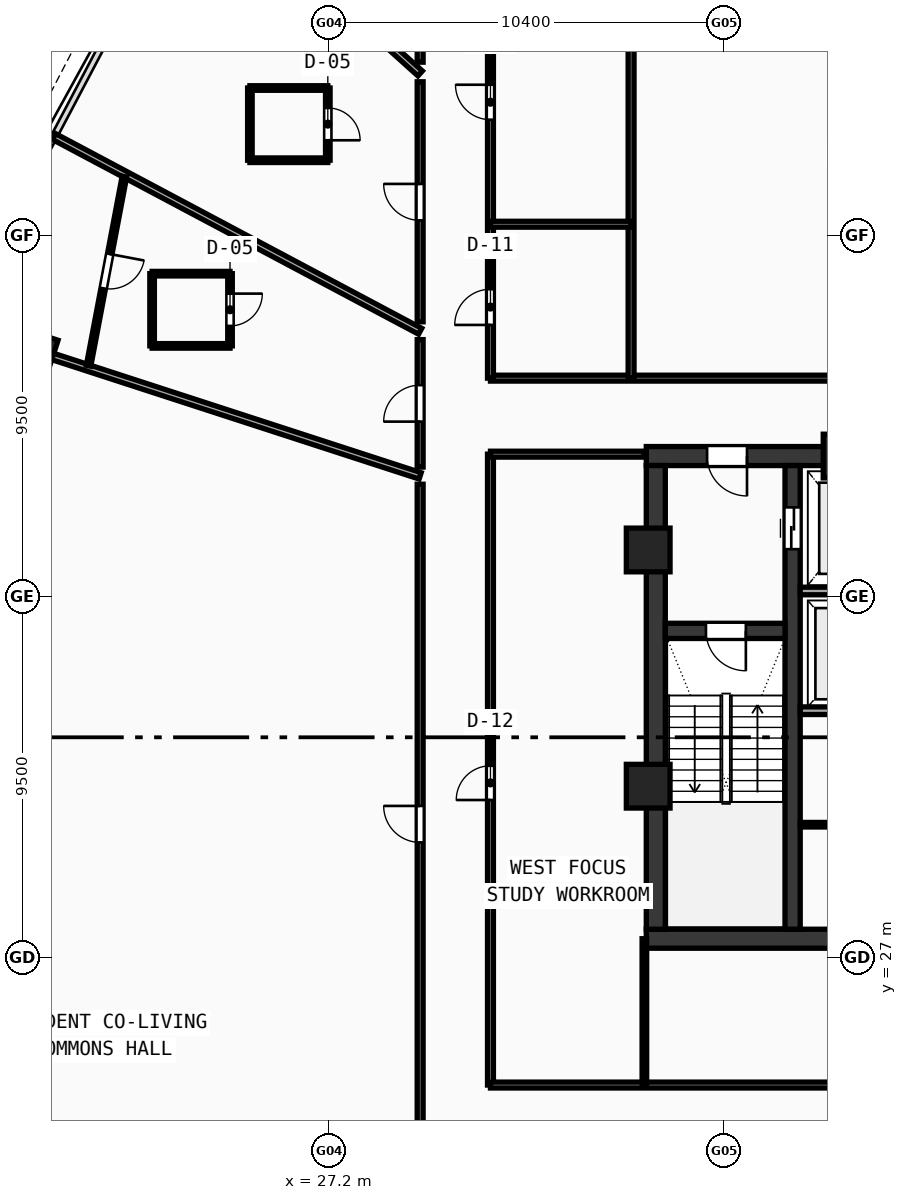
"""IFC4 building model, lengths in metres.
Left out: names, types, materials, properties, quantities, classifications, styles, units other than length and angle.
Written with IfcOpenShell. Run it as: python <this file> out.ifc"""

import sys

from ifc_helpers import new_model, si_unit, direction, frame, frame_2d, origin, origin_with_axes, origin_2d, place, context, subcontext, project, spatial, rectangle, hollow_rectangle, extrude, source, transform, mapped, element, fill, save


model = new_model("IFC4")
c1 = context("Model", 3, precision=1e-05, world=origin(), true_north=direction((0.0, 1.0)))
c2 = subcontext(c1, "Body", "Model", "MODEL_VIEW")
j1 = project(units=[si_unit("LENGTHUNIT", "METRE"), si_unit("PLANEANGLEUNIT", "RADIAN")], contexts=[c1])
p1 = place(None, origin())
s1 = spatial("IfcSite", under=j1, at=p1, CompositionType="ELEMENT")
p2 = place(p1, origin())
s2 = spatial("IfcBuilding", under=s1, at=p2, CompositionType="ELEMENT")
p3 = place(p2, frame((0.0, 0.0, 180.96)))
s3 = spatial("IfcBuildingStorey", under=s2, at=p3, CompositionType="ELEMENT", Elevation=180.96)
p4 = place(p3, frame((35.55, 27.5, 0.0), z_axis=(0.0, 0.0, 1.0), x_axis=(1.0, 0.0, 0.0)))
e1 = element("IfcWall", 1, at=p4, inside=s3, PredefinedType="SHEAR", context=c2, shape_type="SweptSolid", body=[
    extrude(rectangle(XDim=24.9, YDim=0.5, at=frame_2d((12.45, 0.0))), origin(), (0.0, 0.0, 1.0), 3.54),
])
p5 = place(p3, frame((35.55, 40.2, 0.0), z_axis=(0.0, 0.0, 1.0), x_axis=(1.0, 0.0, 0.0)))
e2 = element("IfcWall", 2, at=p5, inside=s3, PredefinedType="SHEAR", context=c2, shape_type="SweptSolid", body=[
    extrude(rectangle(XDim=11.25, YDim=0.5, at=frame_2d((5.625, 0.0))), origin(), (0.0, 0.0, 1.0), 3.54),
])
p6 = place(p5, frame((1.6, 0.0, 0.0)))
e3 = element("IfcOpeningElement", 3, at=p6, cuts=e2, PredefinedType="OPENING", context=c2, shape_type="SweptSolid", body=[
    extrude(rectangle(XDim=1.05, YDim=2.1, at=frame_2d((0.525, 1.05))), frame((0.0, 0.26, 0.0), z_axis=(0.0, -1.0, 0.0), x_axis=(1.0, 0.0, 0.0)), (0.0, 0.0, 1.0), 0.52),
])
p7 = place(p3, frame((35.8, 27.75, 0.0), z_axis=(0.0, 0.0, 1.0), x_axis=(0.0, 1.0, 0.0)))
e4 = element("IfcWall", 4, at=p7, inside=s3, PredefinedType="SHEAR", context=c2, shape_type="SweptSolid", body=[
    extrude(rectangle(XDim=12.2, YDim=0.5, at=frame_2d((6.1, 0.0))), origin(), (0.0, 0.0, 1.0), 3.54),
])
p8 = place(p3, frame((39.4, 27.75, 0.0), z_axis=(0.0, 0.0, 1.0), x_axis=(0.0, 1.0, 0.0)))
e5 = element("IfcWall", 5, at=p8, inside=s3, PredefinedType="SHEAR", context=c2, shape_type="SweptSolid", body=[
    extrude(rectangle(XDim=12.2, YDim=0.4, at=frame_2d((6.1, 0.0))), origin(), (0.0, 0.0, 1.0), 3.54),
])
p9 = place(p8, frame((10.0, 0.0, 0.0)))
e6 = element("IfcOpeningElement", 6, at=p9, cuts=e5, PredefinedType="OPENING", context=c2, shape_type="SweptSolid", body=[
    extrude(rectangle(XDim=1.1, YDim=2.1, at=frame_2d((0.55, 1.05))), frame((0.0, 0.21, 0.0), z_axis=(0.0, -1.0, 0.0), x_axis=(1.0, 0.0, 0.0)), (0.0, 0.0, 1.0), 0.42),
])
p10 = place(p3, frame((36.05, 35.6, 0.0), z_axis=(0.0, 0.0, 1.0), x_axis=(1.0, 0.0, 0.0)))
e7 = element("IfcWall", 7, at=p10, inside=s3, PredefinedType="SHEAR", context=c2, shape_type="SweptSolid", body=[
    extrude(rectangle(XDim=3.15, YDim=0.4, at=frame_2d((1.575, 0.0))), origin(), (0.0, 0.0, 1.0), 3.54),
])
p11 = place(p10, frame((1.07, 0.0, 0.0)))
e8 = element("IfcOpeningElement", 8, at=p11, cuts=e7, PredefinedType="OPENING", context=c2, shape_type="SweptSolid", body=[
    extrude(rectangle(XDim=1.05, YDim=2.1, at=frame_2d((0.525, 1.05))), frame((0.0, 0.21, 0.0), z_axis=(0.0, -1.0, 0.0), x_axis=(1.0, 0.0, 0.0)), (0.0, 0.0, 1.0), 0.42),
])
m1 = source(origin(), c2, "Body", "SweptSolid", [
    extrude(hollow_rectangle(XDim=1.15, YDim=1.15, WallThickness=0.048, at=origin_2d()), origin(), (0.0, 0.0, 1.0), 3.8),
])
for number, where, z_axis, x_axis in (
    (9, (40.781, 40.2, -0.26), (0.0, 0.0, 1.0), (1.0, 0.0, 0.0)),
    (10, (35.6, 37.729, -0.26), (0.0, 0.0, 1.0), (1.0, 0.0, 0.0)),
    (11, (35.6, 31.513, -0.26), (0.0, 0.0, 1.0), (1.0, 0.0, 0.0)),
):
    element("IfcColumn", number, at=place(p3, frame(where, z_axis=z_axis, x_axis=x_axis)), inside=s3, PredefinedType="COLUMN", context=c2, shape_type="MappedRepresentation", body=[
        mapped(m1, transform((0.0, 0.0, 0.0), scale=1.0)),
    ])
m2 = source(origin(), c2, "Body", "SweptSolid", [
    extrude(hollow_rectangle(XDim=0.9, YDim=0.9, WallThickness=0.036, at=origin_2d()), origin(), (0.0, 0.0, 1.0), 3.8),
])
p12 = place(p3, frame((19.505, 42.958, -0.26), z_axis=(0.0, 0.0, 1.0), x_axis=(-0.309016994375, -0.951056516295, 0.0)))
e12 = element("IfcColumn", 12, at=p12, inside=s3, PredefinedType="COLUMN", context=c2, shape_type="MappedRepresentation", body=[
    mapped(m2, transform((0.0, 0.0, 0.0), scale=1.0)),
])
for number, where, z_axis, x_axis in (
    (13, (39.6, 36.65, 0.0), (0.0, 0.0, 1.0), (1.0, 0.0, 0.0)),
    (14, (39.6, 33.5, 0.0), (0.0, 0.0, 1.0), (1.0, 0.0, 0.0)),
):
    element("IfcWall", number, at=place(p3, frame(where, z_axis=z_axis, x_axis=x_axis)), inside=s3, PredefinedType="SOLIDWALL", context=c2, shape_type="SweptSolid", body=[
        extrude(rectangle(XDim=2.72, YDim=0.2, at=frame_2d((1.36, 0.0))), origin(), (0.0, 0.0, 1.0), 3.54),
    ])
p13 = place(p3, frame((39.6, 30.5, 0.0), z_axis=(0.0, 0.0, 1.0), x_axis=(1.0, 0.0, 0.0)))
e15 = element("IfcWall", 15, at=p13, inside=s3, PredefinedType="PARTITIONING", context=c2, shape_type="SweptSolid", body=[
    extrude(rectangle(XDim=2.72, YDim=0.12, at=frame_2d((1.36, 0.0))), origin(), (0.0, 0.0, 1.0), 3.54),
])
p14 = place(p3, frame((31.45, 42.25, 0.0), z_axis=(0.0, 0.0, 1.0), x_axis=(1.0, 0.0, 0.0)))
e16 = element("IfcWall", 16, at=p14, inside=s3, PredefinedType="PARTITIONING", context=c2, shape_type="SweptSolid", body=[
    extrude(rectangle(XDim=33.1, YDim=0.155, at=frame_2d((16.55, 0.0))), origin(), (0.0, 0.0, 1.0), 2.89),
])
p15 = place(p3, frame((31.45, 42.25, 0.0), z_axis=(0.0, 0.0, 1.0), x_axis=(0.0, 1.0, 0.0)))
e17 = element("IfcWall", 17, at=p15, inside=s3, PredefinedType="PARTITIONING", context=c2, shape_type="SweptSolid", body=[
    extrude(rectangle(XDim=11.7, YDim=0.155, at=frame_2d((5.85, 0.0))), origin(), (0.0, 0.0, 1.0), 2.89),
])
p16 = place(p15, frame((1.4, 0.0, 0.0)))
e18 = element("IfcOpeningElement", 18, at=p16, cuts=e17, PredefinedType="OPENING", context=c2, shape_type="SweptSolid", body=[
    extrude(rectangle(XDim=0.94, YDim=2.1, at=frame_2d((0.47, 1.05))), frame((0.0, 0.087, 0.0), z_axis=(0.0, -1.0, 0.0), x_axis=(1.0, 0.0, 0.0)), (0.0, 0.0, 1.0), 0.175),
])
p17 = place(p15, frame((6.8, 0.0, 0.0)))
e19 = element("IfcOpeningElement", 19, at=p17, cuts=e17, PredefinedType="OPENING", context=c2, shape_type="SweptSolid", body=[
    extrude(rectangle(XDim=0.92, YDim=2.1, at=frame_2d((0.46, 1.05))), frame((0.0, 0.087, 0.0), z_axis=(0.0, -1.0, 0.0), x_axis=(1.0, 0.0, 0.0)), (0.0, 0.0, 1.0), 0.175),
])
p18 = place(p3, frame((35.15, 42.25, 0.0), z_axis=(0.0, 0.0, 1.0), x_axis=(0.0, 1.0, 0.0)))
e20 = element("IfcWall", 20, at=p18, inside=s3, PredefinedType="PARTITIONING", context=c2, shape_type="SweptSolid", body=[
    extrude(rectangle(XDim=11.7, YDim=0.155, at=frame_2d((5.85, 0.0))), origin(), (0.0, 0.0, 1.0), 2.89),
])
p19 = place(p3, frame((31.45, 46.3, 0.0), z_axis=(0.0, 0.0, 1.0), x_axis=(1.0, 0.0, 0.0)))
e21 = element("IfcWall", 21, at=p19, inside=s3, PredefinedType="PARTITIONING", context=c2, shape_type="SweptSolid", body=[
    extrude(rectangle(XDim=3.7, YDim=0.155, at=frame_2d((1.85, 0.0))), origin(), (0.0, 0.0, 1.0), 2.89),
])
p20 = place(p3, frame((31.45, 23.65, 0.0), z_axis=(0.0, 0.0, 1.0), x_axis=(0.0, 1.0, 0.0)))
e22 = element("IfcWall", 22, at=p20, inside=s3, PredefinedType="PARTITIONING", context=c2, shape_type="SweptSolid", body=[
    extrude(rectangle(XDim=16.6, YDim=0.155, at=frame_2d((8.3, 0.0))), origin(), (0.0, 0.0, 1.0), 2.89),
])
p21 = place(p20, frame((7.5, 0.0, 0.0)))
e23 = element("IfcOpeningElement", 23, at=p21, cuts=e22, PredefinedType="OPENING", context=c2, shape_type="SweptSolid", body=[
    extrude(rectangle(XDim=0.9, YDim=2.08, at=frame_2d((0.45, 1.04))), frame((0.0, 0.087, 0.0), z_axis=(0.0, -1.0, 0.0), x_axis=(1.0, 0.0, 0.0)), (0.0, 0.0, 1.0), 0.175),
])
p22 = place(p3, frame((31.45, 23.65, 0.0), z_axis=(0.0, 0.0, 1.0), x_axis=(1.0, 0.0, 0.0)))
e24 = element("IfcWall", 24, at=p22, inside=s3, PredefinedType="PARTITIONING", context=c2, shape_type="SweptSolid", body=[
    extrude(rectangle(XDim=33.1, YDim=0.155, at=frame_2d((16.55, 0.0))), origin(), (0.0, 0.0, 1.0), 2.89),
])
p23 = place(p22, frame((16.0, 0.0, 0.0)))
e25 = element("IfcOpeningElement", 25, at=p23, cuts=e24, PredefinedType="OPENING", context=c2, shape_type="SweptSolid", body=[
    extrude(rectangle(XDim=0.92, YDim=2.1, at=frame_2d((0.46, 1.05))), frame((0.0, 0.087, 0.0), z_axis=(0.0, -1.0, 0.0), x_axis=(1.0, 0.0, 0.0)), (0.0, 0.0, 1.0), 0.175),
])
p24 = place(p3, frame((31.45, 40.25, 0.0), z_axis=(0.0, 0.0, 1.0), x_axis=(1.0, 0.0, 0.0)))
e26 = element("IfcWall", 26, at=p24, inside=s3, PredefinedType="PARTITIONING", context=c2, shape_type="SweptSolid", body=[
    extrude(rectangle(XDim=4.05, YDim=0.155, at=frame_2d((2.025, 0.0))), origin(), (0.0, 0.0, 1.0), 3.54),
])
p25 = place(p3, frame((35.5, 23.65, 0.0), z_axis=(0.0, 0.0, 1.0), x_axis=(0.0, 1.0, 0.0)))
e27 = element("IfcWall", 27, at=p25, inside=s3, PredefinedType="PARTITIONING", context=c2, shape_type="SweptSolid", body=[
    extrude(rectangle(XDim=3.85, YDim=0.12, at=frame_2d((1.925, 0.0))), origin(), (0.0, 0.0, 1.0), 3.14),
])
p26 = place(p3, frame((29.6, 50.267, 0.0), z_axis=(0.0, 0.0, 1.0), x_axis=(-0.743139097079, 0.669136968335, 0.0)))
e28 = element("IfcWall", 28, at=p26, inside=s3, PredefinedType="PARTITIONING", context=c2, shape_type="SweptSolid", body=[
    extrude(rectangle(XDim=7.987, YDim=0.175, at=frame_2d((3.994, 0.0))), origin(), (0.0, 0.0, 1.0), 2.89),
])
p27 = place(p3, frame((29.6, 43.483, 0.0), z_axis=(0.0, 0.0, 1.0), x_axis=(-0.882940086537, 0.469485679853, 0.0)))
e29 = element("IfcWall", 29, at=p27, inside=s3, PredefinedType="PARTITIONING", context=c2, shape_type="SweptSolid", body=[
    extrude(rectangle(XDim=10.91, YDim=0.175, at=frame_2d((5.455, 0.0))), origin(), (0.0, 0.0, 1.0), 2.89),
])
p28 = place(p3, frame((29.6, 39.678, 0.0), z_axis=(0.0, 0.0, 1.0), x_axis=(-0.951054689993, 0.309022615097, 0.0)))
e30 = element("IfcWall", 30, at=p28, inside=s3, PredefinedType="PARTITIONING", context=c2, shape_type="SweptSolid", body=[
    extrude(rectangle(XDim=12.875, YDim=0.175, at=frame_2d((6.438, 0.0))), origin(), (0.0, 0.0, 1.0), 2.89),
])
p29 = place(p3, frame((29.6, 21.8, 0.0), z_axis=(0.0, 0.0, 1.0), x_axis=(0.0, 1.0, 0.0)))
e31 = element("IfcWall", 31, at=p29, inside=s3, PredefinedType="PARTITIONING", context=c2, shape_type="SweptSolid", body=[
    extrude(rectangle(XDim=17.659, YDim=0.155, at=frame_2d((8.829, 0.0))), origin(), (0.0, 0.0, 1.0), 2.89),
])
p30 = place(p29, frame((8.234, 0.0, 0.0)))
e32 = element("IfcOpeningElement", 32, at=p30, cuts=e31, PredefinedType="OPENING", context=c2, shape_type="SweptSolid", body=[
    extrude(rectangle(XDim=0.96, YDim=2.12, at=frame_2d((0.48, 1.06))), frame((0.0, 0.087, 0.0), z_axis=(0.0, -1.0, 0.0), x_axis=(1.0, 0.0, 0.0)), (0.0, 0.0, 1.0), 0.175),
])
p31 = place(p3, frame((29.6, 39.91, 0.0), z_axis=(0.0, 0.0, 1.0), x_axis=(0.0, 1.0, 0.0)))
e33 = element("IfcWall", 33, at=p31, inside=s3, PredefinedType="PARTITIONING", context=c2, shape_type="SweptSolid", body=[
    extrude(rectangle(XDim=3.354, YDim=0.155, at=frame_2d((1.677, 0.0))), origin(), (0.0, 0.0, 1.0), 3.54),
])
p32 = place(p31, frame((1.196, 0.0, 0.0)))
e34 = element("IfcOpeningElement", 34, at=p32, cuts=e33, PredefinedType="OPENING", context=c2, shape_type="SweptSolid", body=[
    extrude(rectangle(XDim=0.96, YDim=2.12, at=frame_2d((0.48, 1.06))), frame((0.0, 0.087, 0.0), z_axis=(0.0, -1.0, 0.0), x_axis=(1.0, 0.0, 0.0)), (0.0, 0.0, 1.0), 0.175),
])
p33 = place(p3, frame((29.6, 43.733, 0.0), z_axis=(0.0, 0.0, 1.0), x_axis=(0.0, 1.0, 0.0)))
e35 = element("IfcWall", 35, at=p33, inside=s3, PredefinedType="PARTITIONING", context=c2, shape_type="SweptSolid", body=[
    extrude(rectangle(XDim=6.315, YDim=0.155, at=frame_2d((3.157, 0.0))), origin(), (0.0, 0.0, 1.0), 2.89),
])
p34 = place(p33, frame((2.668, 0.0, 0.0)))
e36 = element("IfcOpeningElement", 36, at=p34, cuts=e35, PredefinedType="OPENING", context=c2, shape_type="SweptSolid", body=[
    extrude(rectangle(XDim=0.96, YDim=2.12, at=frame_2d((0.48, 1.06))), frame((0.0, 0.087, 0.0), z_axis=(0.0, -1.0, 0.0), x_axis=(1.0, 0.0, 0.0)), (0.0, 0.0, 1.0), 0.175),
])
p35 = place(p3, frame((29.6, 50.563, 0.0), z_axis=(0.0, 0.0, 1.0), x_axis=(0.0, 1.0, 0.0)))
e37 = element("IfcWall", 37, at=p35, inside=s3, PredefinedType="PARTITIONING", context=c2, shape_type="SweptSolid", body=[
    extrude(rectangle(XDim=5.237, YDim=0.155, at=frame_2d((2.618, 0.0))), origin(), (0.0, 0.0, 1.0), 3.54),
])
p36 = place(p3, frame((25.12, 47.984, 0.0), z_axis=(0.0, 0.0, 1.0), x_axis=(1.0, 0.0, 0.0)))
e38 = element("IfcWall", 38, at=p36, inside=s3, PredefinedType="PARTITIONING", context=c2, shape_type="SweptSolid", body=[
    extrude(rectangle(XDim=2.05, YDim=0.12, at=frame_2d((1.025, 0.0))), origin(), (0.0, 0.0, 1.0), 3.54),
])
p37 = place(p3, frame((27.17, 47.984, 0.0), z_axis=(0.0, 0.0, 1.0), x_axis=(0.0, 1.0, 0.0)))
e39 = element("IfcWall", 39, at=p37, inside=s3, PredefinedType="PARTITIONING", context=c2, shape_type="SweptSolid", body=[
    extrude(rectangle(XDim=1.9, YDim=0.12, at=frame_2d((0.95, 0.0))), origin(), (0.0, 0.0, 1.0), 3.54),
])
p38 = place(p37, frame((0.525, 0.0, 0.0)))
e40 = element("IfcOpeningElement", 40, at=p38, cuts=e39, PredefinedType="OPENING", context=c2, shape_type="SweptSolid", body=[
    extrude(rectangle(XDim=0.85, YDim=2.1, at=frame_2d((0.425, 1.05))), frame((0.0, 0.07, 0.0), z_axis=(0.0, -1.0, 0.0), x_axis=(1.0, 0.0, 0.0)), (0.0, 0.0, 1.0), 0.14),
])
p39 = place(p3, frame((27.17, 49.884, 0.0), z_axis=(0.0, 0.0, 1.0), x_axis=(-1.0, 0.0, 0.0)))
e41 = element("IfcWall", 41, at=p39, inside=s3, PredefinedType="PARTITIONING", context=c2, shape_type="SweptSolid", body=[
    extrude(rectangle(XDim=2.05, YDim=0.12, at=frame_2d((1.025, 0.0))), origin(), (0.0, 0.0, 1.0), 3.54),
])
p40 = place(p3, frame((25.12, 49.884, 0.0), z_axis=(0.0, 0.0, 1.0), x_axis=(0.0, -1.0, 0.0)))
e42 = element("IfcWall", 42, at=p40, inside=s3, PredefinedType="PARTITIONING", context=c2, shape_type="SweptSolid", body=[
    extrude(rectangle(XDim=1.9, YDim=0.12, at=frame_2d((0.95, 0.0))), origin(), (0.0, 0.0, 1.0), 3.54),
])
p41 = place(p3, frame((22.547, 43.099, 0.0), z_axis=(0.0, 0.0, 1.0), x_axis=(1.0, 0.0, 0.0)))
e43 = element("IfcWall", 43, at=p41, inside=s3, PredefinedType="PARTITIONING", context=c2, shape_type="SweptSolid", body=[
    extrude(rectangle(XDim=2.05, YDim=0.12, at=frame_2d((1.025, 0.0))), origin(), (0.0, 0.0, 1.0), 3.54),
])
p42 = place(p3, frame((24.597, 43.099, 0.0), z_axis=(0.0, 0.0, 1.0), x_axis=(0.0, 1.0, 0.0)))
e44 = element("IfcWall", 44, at=p42, inside=s3, PredefinedType="PARTITIONING", context=c2, shape_type="SweptSolid", body=[
    extrude(rectangle(XDim=1.9, YDim=0.12, at=frame_2d((0.95, 0.0))), origin(), (0.0, 0.0, 1.0), 3.54),
])
p43 = place(p42, frame((0.525, 0.0, 0.0)))
e45 = element("IfcOpeningElement", 45, at=p43, cuts=e44, PredefinedType="OPENING", context=c2, shape_type="SweptSolid", body=[
    extrude(rectangle(XDim=0.85, YDim=2.1, at=frame_2d((0.425, 1.05))), frame((0.0, 0.07, 0.0), z_axis=(0.0, -1.0, 0.0), x_axis=(1.0, 0.0, 0.0)), (0.0, 0.0, 1.0), 0.14),
])
p44 = place(p3, frame((24.597, 44.999, 0.0), z_axis=(0.0, 0.0, 1.0), x_axis=(-1.0, 0.0, 0.0)))
e46 = element("IfcWall", 46, at=p44, inside=s3, PredefinedType="PARTITIONING", context=c2, shape_type="SweptSolid", body=[
    extrude(rectangle(XDim=2.05, YDim=0.12, at=frame_2d((1.025, 0.0))), origin(), (0.0, 0.0, 1.0), 3.54),
])
p45 = place(p3, frame((22.547, 44.999, 0.0), z_axis=(0.0, 0.0, 1.0), x_axis=(0.0, -1.0, 0.0)))
e47 = element("IfcWall", 47, at=p45, inside=s3, PredefinedType="PARTITIONING", context=c2, shape_type="SweptSolid", body=[
    extrude(rectangle(XDim=1.9, YDim=0.12, at=frame_2d((0.95, 0.0))), origin(), (0.0, 0.0, 1.0), 3.54),
])
p46 = place(p3, frame((21.818, 47.553, 0.0), z_axis=(0.0, 0.0, 1.0), x_axis=(-0.186234987185, -0.982505231308, 0.0)))
e48 = element("IfcWall", 48, at=p46, inside=s3, PredefinedType="PARTITIONING", context=c2, shape_type="SweptSolid", body=[
    extrude(rectangle(XDim=5.065, YDim=0.12, at=frame_2d((2.533, 0.0))), origin(), (0.0, 0.0, 1.0), 2.89),
])
p47 = place(p46, frame((2.073, 0.0, 0.0)))
e49 = element("IfcOpeningElement", 49, at=p47, cuts=e48, PredefinedType="OPENING", context=c2, shape_type="SweptSolid", body=[
    extrude(rectangle(XDim=0.92, YDim=2.1, at=frame_2d((0.46, 1.05))), frame((0.0, 0.07, 0.0), z_axis=(0.0, -1.0, 0.0), x_axis=(1.0, 0.0, 0.0)), (0.0, 0.0, 1.0), 0.14),
])
m3 = source(origin(), c2, "Body", "SweptSolid", [
    extrude(rectangle(XDim=1.05, YDim=2.1, at=frame_2d((0.525, 1.05))), frame((0.0, 0.025, 0.0), z_axis=(0.0, -1.0, 0.0), x_axis=(1.0, 0.0, 0.0)), (0.0, 0.0, 1.0), 0.05),
])
p48 = place(p11, frame((1.05, 0.0, 0.0), z_axis=(0.0, 0.0, 1.0), x_axis=(-1.0, 0.0, 0.0)))
e50 = element("IfcDoor", 50, at=p48, inside=s3, OperationType="SINGLE_SWING_LEFT", PredefinedType="DOOR", context=c2, shape_type="MappedRepresentation", body=[
    mapped(m3, transform((0.0, 0.0, 0.0), scale=1.0)),
])
fill(e8, e50)
p49 = place(p6, frame((1.05, 0.0, 0.0), z_axis=(0.0, 0.0, 1.0), x_axis=(-1.0, 0.0, 0.0)))
e51 = element("IfcDoor", 51, at=p49, inside=s3, OperationType="SINGLE_SWING_LEFT", PredefinedType="DOOR", context=c2, shape_type="MappedRepresentation", body=[
    mapped(m3, transform((0.0, 0.0, 0.0), scale=1.0)),
])
fill(e3, e51)
m4 = source(origin(), c2, "Body", "SweptSolid", [
    extrude(rectangle(XDim=1.1, YDim=2.1, at=frame_2d((0.55, 1.05))), frame((0.0, 0.025, 0.0), z_axis=(0.0, -1.0, 0.0), x_axis=(1.0, 0.0, 0.0)), (0.0, 0.0, 1.0), 0.05),
])
p50 = place(p9, frame((1.1, 0.0, 0.0), z_axis=(0.0, 0.0, 1.0), x_axis=(-1.0, 0.0, 0.0)))
e52 = element("IfcDoor", 52, at=p50, inside=s3, OperationType="DOUBLE_DOOR_SLIDING", PredefinedType="DOOR", context=c2, shape_type="MappedRepresentation", body=[
    mapped(m4, transform((0.0, 0.0, 0.0), scale=1.0)),
])
fill(e6, e52)
m5 = source(origin(), c2, "Body", "SweptSolid", [
    extrude(rectangle(XDim=0.94, YDim=2.1, at=frame_2d((0.47, 1.05))), frame((0.0, 0.025, 0.0), z_axis=(0.0, -1.0, 0.0), x_axis=(1.0, 0.0, 0.0)), (0.0, 0.0, 1.0), 0.05),
])
p51 = place(p16, origin_with_axes())
e53 = element("IfcDoor", 53, at=p51, inside=s3, OperationType="SINGLE_SWING_LEFT", PredefinedType="DOOR", context=c2, shape_type="MappedRepresentation", body=[
    mapped(m5, transform((0.0, 0.0, 0.0), scale=1.0)),
])
fill(e18, e53)
m6 = source(origin(), c2, "Body", "SweptSolid", [
    extrude(rectangle(XDim=0.92, YDim=2.1, at=frame_2d((0.46, 1.05))), frame((0.0, 0.025, 0.0), z_axis=(0.0, -1.0, 0.0), x_axis=(1.0, 0.0, 0.0)), (0.0, 0.0, 1.0), 0.05),
])
p52 = place(p17, origin_with_axes())
e54 = element("IfcDoor", 54, at=p52, inside=s3, OperationType="SINGLE_SWING_RIGHT", PredefinedType="DOOR", context=c2, shape_type="MappedRepresentation", body=[
    mapped(m6, transform((0.0, 0.0, 0.0), scale=1.0)),
])
fill(e19, e54)
m7 = source(origin(), c2, "Body", "SweptSolid", [
    extrude(rectangle(XDim=0.9, YDim=2.08, at=frame_2d((0.45, 1.04))), frame((0.0, 0.025, 0.0), z_axis=(0.0, -1.0, 0.0), x_axis=(1.0, 0.0, 0.0)), (0.0, 0.0, 1.0), 0.05),
])
p53 = place(p21, origin_with_axes())
e55 = element("IfcDoor", 55, at=p53, inside=s3, OperationType="SINGLE_SWING_LEFT", PredefinedType="DOOR", context=c2, shape_type="MappedRepresentation", body=[
    mapped(m7, transform((0.0, 0.0, 0.0), scale=1.0)),
])
fill(e23, e55)
m8 = source(origin(), c2, "Body", "SweptSolid", [
    extrude(rectangle(XDim=0.96, YDim=2.12, at=frame_2d((0.48, 1.06))), frame((0.0, 0.025, 0.0), z_axis=(0.0, -1.0, 0.0), x_axis=(1.0, 0.0, 0.0)), (0.0, 0.0, 1.0), 0.05),
])
p54 = place(p34, origin_with_axes())
e56 = element("IfcDoor", 56, at=p54, inside=s3, OperationType="SINGLE_SWING_RIGHT", PredefinedType="DOOR", context=c2, shape_type="MappedRepresentation", body=[
    mapped(m8, transform((0.0, 0.0, 0.0), scale=1.0)),
])
fill(e36, e56)
m9 = source(origin(), c2, "Body", "SweptSolid", [
    extrude(rectangle(XDim=0.85, YDim=2.1, at=frame_2d((0.425, 1.05))), frame((0.0, 0.025, 0.0), z_axis=(0.0, -1.0, 0.0), x_axis=(1.0, 0.0, 0.0)), (0.0, 0.0, 1.0), 0.05),
])
p55 = place(p38, frame((0.85, 0.0, 0.0), z_axis=(0.0, 0.0, 1.0), x_axis=(-1.0, 0.0, 0.0)))
e57 = element("IfcDoor", 57, at=p55, inside=s3, OperationType="SINGLE_SWING_RIGHT", PredefinedType="DOOR", context=c2, shape_type="MappedRepresentation", body=[
    mapped(m9, transform((0.0, 0.0, 0.0), scale=1.0)),
])
fill(e40, e57)
p56 = place(p32, origin_with_axes())
e58 = element("IfcDoor", 58, at=p56, inside=s3, OperationType="SINGLE_SWING_LEFT", PredefinedType="DOOR", context=c2, shape_type="MappedRepresentation", body=[
    mapped(m8, transform((0.0, 0.0, 0.0), scale=1.0)),
])
fill(e34, e58)
p57 = place(p43, frame((0.85, 0.0, 0.0), z_axis=(0.0, 0.0, 1.0), x_axis=(-1.0, 0.0, 0.0)))
e59 = element("IfcDoor", 59, at=p57, inside=s3, OperationType="SINGLE_SWING_LEFT", PredefinedType="DOOR", context=c2, shape_type="MappedRepresentation", body=[
    mapped(m9, transform((0.0, 0.0, 0.0), scale=1.0)),
])
fill(e45, e59)
p58 = place(p47, origin_with_axes())
e60 = element("IfcDoor", 60, at=p58, inside=s3, OperationType="SINGLE_SWING_LEFT", PredefinedType="DOOR", context=c2, shape_type="MappedRepresentation", body=[
    mapped(m6, transform((0.0, 0.0, 0.0), scale=1.0)),
])
fill(e49, e60)
p59 = place(p30, origin_with_axes())
e61 = element("IfcDoor", 61, at=p59, inside=s3, OperationType="SINGLE_SWING_RIGHT", PredefinedType="DOOR", context=c2, shape_type="MappedRepresentation", body=[
    mapped(m8, transform((0.0, 0.0, 0.0), scale=1.0)),
])
fill(e32, e61)
save(model, sys.argv[1])
